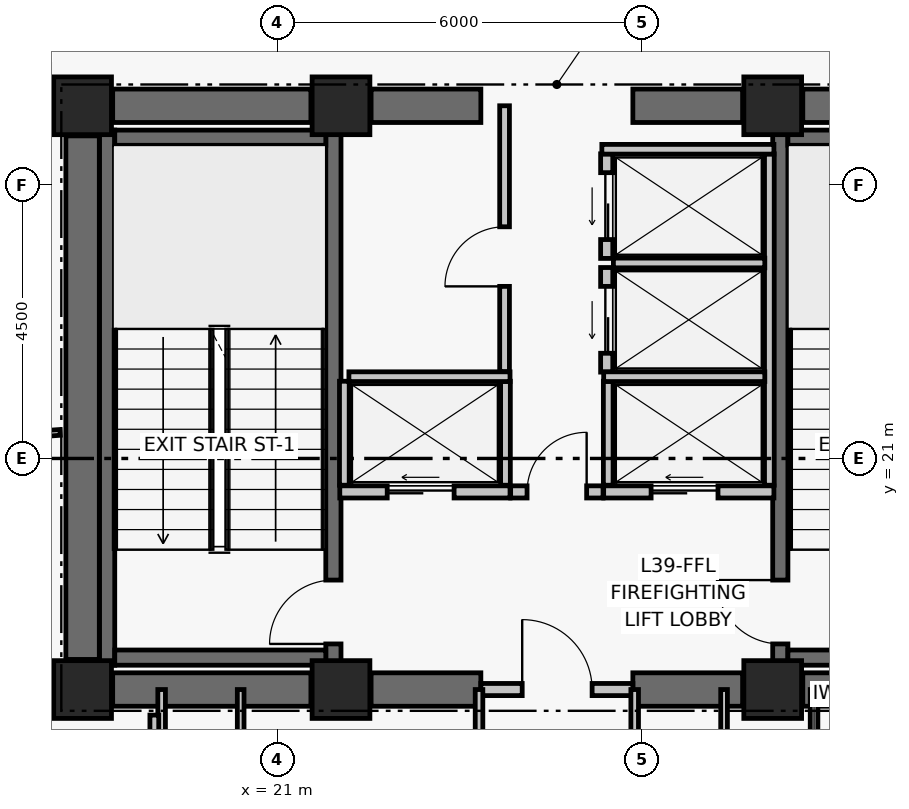
"""IFC4 building model, lengths in metres.
Left out: names, types, materials, properties, quantities, classifications, styles, units other than length and angle.
Written with IfcOpenShell. Run it as: python <this file> out.ifc"""

import sys

from ifc_helpers import new_model, si_unit, direction, frame, frame_2d, origin, origin_2d, place, context, subcontext, project, spatial, rectangle, extrude, element, fill, save


model = new_model("IFC4")
c1 = context("Model", 3, precision=1e-05, world=origin(), true_north=direction((0.0, 1.0)))
c2 = subcontext(c1, "Body", "Model", "MODEL_VIEW")
j1 = project(units=[si_unit("LENGTHUNIT", "METRE"), si_unit("PLANEANGLEUNIT", "RADIAN")], contexts=[c1])
p1 = place(None, origin())
s1 = spatial("IfcSite", under=j1, at=p1, CompositionType="ELEMENT")
p2 = place(p1, origin())
s2 = spatial("IfcBuilding", under=s1, at=p2, CompositionType="ELEMENT")
p3 = place(p2, frame((0.0, 0.0, 158.04)))
s3 = spatial("IfcBuildingStorey", under=s2, at=p3, CompositionType="ELEMENT", Elevation=158.04)
for number, where, z_axis, x_axis in (
    (1, (17.8, 17.2, 0.0), (0.0, 0.0, 1.0), (1.0, 0.0, 0.0)),
    (2, (22.05, 17.2, 0.0), (0.0, 0.0, 1.0), (1.0, 0.0, 0.0)),
    (3, (29.15, 17.2, 0.0), (0.0, 0.0, 1.0), (1.0, 0.0, 0.0)),
    (4, (17.8, 26.8, 0.0), (0.0, 0.0, 1.0), (1.0, 0.0, 0.0)),
    (5, (22.05, 26.8, 0.0), (0.0, 0.0, 1.0), (1.0, 0.0, 0.0)),
    (6, (29.15, 26.8, 0.0), (0.0, 0.0, 1.0), (1.0, 0.0, 0.0)),
):
    element("IfcColumn", number, at=place(p3, frame(where, z_axis=z_axis, x_axis=x_axis)), inside=s3, PredefinedType="COLUMN", context=c2, shape_type="SweptSolid", body=[
        extrude(rectangle(XDim=0.95, YDim=0.95, at=origin_2d()), origin(), (0.0, 0.0, 1.0), 3.72),
    ])
p4 = place(p3, frame((18.295, 17.2, 0.0), z_axis=(0.0, 0.0, 1.0), x_axis=(1.0, 0.0, 0.0)))
e7 = element("IfcWall", 7, at=p4, inside=s3, PredefinedType="SHEAR", context=c2, shape_type="SweptSolid", body=[
    extrude(rectangle(XDim=3.26, YDim=0.55, at=frame_2d((1.63, 0.0))), origin(), (0.0, 0.0, 1.0), 3.5),
])
p5 = place(p3, frame((22.545, 17.2, 0.0), z_axis=(0.0, 0.0, 1.0), x_axis=(1.0, 0.0, 0.0)))
e8 = element("IfcWall", 8, at=p5, inside=s3, PredefinedType="SHEAR", context=c2, shape_type="SweptSolid", body=[
    extrude(rectangle(XDim=1.805, YDim=0.55, at=frame_2d((0.903, 0.0))), origin(), (0.0, 0.0, 1.0), 3.5),
])
p6 = place(p3, frame((26.85, 17.2, 0.0), z_axis=(0.0, 0.0, 1.0), x_axis=(1.0, 0.0, 0.0)))
e9 = element("IfcWall", 9, at=p6, inside=s3, PredefinedType="SHEAR", context=c2, shape_type="SweptSolid", body=[
    extrude(rectangle(XDim=1.805, YDim=0.55, at=frame_2d((0.902, 0.0))), origin(), (0.0, 0.0, 1.0), 3.5),
])
for number, where, z_axis, x_axis in (
    (10, (29.645, 17.2, 0.0), (0.0, 0.0, 1.0), (1.0, 0.0, 0.0)),
    (11, (18.295, 26.8, 0.0), (0.0, 0.0, 1.0), (1.0, 0.0, 0.0)),
):
    element("IfcWall", number, at=place(p3, frame(where, z_axis=z_axis, x_axis=x_axis)), inside=s3, PredefinedType="SHEAR", context=c2, shape_type="SweptSolid", body=[
        extrude(rectangle(XDim=3.26, YDim=0.55, at=frame_2d((1.63, 0.0))), origin(), (0.0, 0.0, 1.0), 3.5),
    ])
p7 = place(p3, frame((22.545, 26.8, 0.0), z_axis=(0.0, 0.0, 1.0), x_axis=(1.0, 0.0, 0.0)))
e12 = element("IfcWall", 12, at=p7, inside=s3, PredefinedType="SHEAR", context=c2, shape_type="SweptSolid", body=[
    extrude(rectangle(XDim=1.805, YDim=0.55, at=frame_2d((0.903, 0.0))), origin(), (0.0, 0.0, 1.0), 3.5),
])
p8 = place(p3, frame((26.85, 26.8, 0.0), z_axis=(0.0, 0.0, 1.0), x_axis=(1.0, 0.0, 0.0)))
e13 = element("IfcWall", 13, at=p8, inside=s3, PredefinedType="SHEAR", context=c2, shape_type="SweptSolid", body=[
    extrude(rectangle(XDim=1.805, YDim=0.55, at=frame_2d((0.902, 0.0))), origin(), (0.0, 0.0, 1.0), 3.5),
])
p9 = place(p3, frame((29.645, 26.8, 0.0), z_axis=(0.0, 0.0, 1.0), x_axis=(1.0, 0.0, 0.0)))
e14 = element("IfcWall", 14, at=p9, inside=s3, PredefinedType="SHEAR", context=c2, shape_type="SweptSolid", body=[
    extrude(rectangle(XDim=3.26, YDim=0.55, at=frame_2d((1.63, 0.0))), origin(), (0.0, 0.0, 1.0), 3.5),
])
p10 = place(p3, frame((17.8, 17.695, 0.0), z_axis=(0.0, 0.0, 1.0), x_axis=(0.0, 1.0, 0.0)))
e15 = element("IfcWall", 15, at=p10, inside=s3, PredefinedType="SHEAR", context=c2, shape_type="SweptSolid", body=[
    extrude(rectangle(XDim=8.61, YDim=0.55, at=frame_2d((4.305, 0.0))), origin(), (0.0, 0.0, 1.0), 3.5),
])
p11 = place(p3, frame((18.204, 17.6, 0.0), z_axis=(0.0, 0.0, 1.0), x_axis=(0.0, 1.0, 0.0)))
e16 = element("IfcWall", 16, at=p11, inside=s3, PredefinedType="SHEAR", context=c2, shape_type="SweptSolid", body=[
    extrude(rectangle(XDim=8.8, YDim=0.25, at=frame_2d((4.4, 0.0))), origin(), (0.0, 0.0, 1.0), 3.5),
])
p12 = place(p3, frame((21.925, 17.6, 0.0), z_axis=(0.0, 0.0, 1.0), x_axis=(0.0, 1.0, 0.0)))
e17 = element("IfcWall", 17, at=p12, inside=s3, PredefinedType="SHEAR", context=c2, shape_type="SweptSolid", body=[
    extrude(rectangle(XDim=8.8, YDim=0.25, at=frame_2d((4.4, 0.0))), origin(), (0.0, 0.0, 1.0), 3.5),
])
p13 = place(p12, frame((0.35, 0.0, 0.0)))
e18 = element("IfcOpeningElement", 18, at=p13, cuts=e17, PredefinedType="OPENING", context=c2, shape_type="SweptSolid", body=[
    extrude(rectangle(XDim=1.05, YDim=2.08, at=frame_2d((0.525, 1.04))), frame((0.0, 0.135, 0.0), z_axis=(0.0, -1.0, 0.0), x_axis=(1.0, 0.0, 0.0)), (0.0, 0.0, 1.0), 0.27),
])
for number, where, z_axis, x_axis in (
    (19, (18.329, 17.725, 0.0), (0.0, 0.0, 1.0), (1.0, 0.0, 0.0)),
    (20, (18.329, 26.275, 0.0), (0.0, 0.0, 1.0), (1.0, 0.0, 0.0)),
):
    element("IfcWall", number, at=place(p3, frame(where, z_axis=z_axis, x_axis=x_axis)), inside=s3, PredefinedType="SHEAR", context=c2, shape_type="SweptSolid", body=[
        extrude(rectangle(XDim=3.471, YDim=0.25, at=frame_2d((1.735, 0.0))), origin(), (0.0, 0.0, 1.0), 3.5),
    ])
p14 = place(p3, frame((29.275, 17.6, 0.0), z_axis=(0.0, 0.0, 1.0), x_axis=(0.0, 1.0, 0.0)))
e21 = element("IfcWall", 21, at=p14, inside=s3, PredefinedType="SHEAR", context=c2, shape_type="SweptSolid", body=[
    extrude(rectangle(XDim=8.8, YDim=0.25, at=frame_2d((4.4, 0.0))), origin(), (0.0, 0.0, 1.0), 3.5),
])
p15 = place(p14, frame((0.35, 0.0, 0.0)))
e22 = element("IfcOpeningElement", 22, at=p15, cuts=e21, PredefinedType="OPENING", context=c2, shape_type="SweptSolid", body=[
    extrude(rectangle(XDim=1.05, YDim=2.08, at=frame_2d((0.525, 1.04))), frame((0.0, 0.135, 0.0), z_axis=(0.0, -1.0, 0.0), x_axis=(1.0, 0.0, 0.0)), (0.0, 0.0, 1.0), 0.27),
])
for number, where, z_axis, x_axis in (
    (23, (29.4, 17.725, 0.0), (0.0, 0.0, 1.0), (1.0, 0.0, 0.0)),
    (24, (29.4, 26.275, 0.0), (0.0, 0.0, 1.0), (1.0, 0.0, 0.0)),
):
    element("IfcWall", number, at=place(p3, frame(where, z_axis=z_axis, x_axis=x_axis)), inside=s3, PredefinedType="SHEAR", context=c2, shape_type="SweptSolid", body=[
        extrude(rectangle(XDim=3.471, YDim=0.25, at=frame_2d((1.736, 0.0))), origin(), (0.0, 0.0, 1.0), 3.5),
    ])
p16 = place(p3, frame((24.35, 17.2, 0.0), z_axis=(0.0, 0.0, 1.0), x_axis=(1.0, 0.0, 0.0)))
e25 = element("IfcWall", 25, at=p16, inside=s3, PredefinedType="PARTITIONING", context=c2, shape_type="SweptSolid", body=[
    extrude(rectangle(XDim=2.5, YDim=0.2, at=frame_2d((1.25, 0.0))), origin(), (0.0, 0.0, 1.0), 2.63),
])
p17 = place(p16, frame((0.68, 0.0, 0.0)))
e26 = element("IfcOpeningElement", 26, at=p17, cuts=e25, PredefinedType="OPENING", context=c2, shape_type="SweptSolid", body=[
    extrude(rectangle(XDim=1.15, YDim=2.08, at=frame_2d((0.575, 1.04))), frame((0.0, 0.11, 0.0), z_axis=(0.0, -1.0, 0.0), x_axis=(1.0, 0.0, 0.0)), (0.0, 0.0, 1.0), 0.22),
])
p18 = place(p3, frame((24.84, 20.45, 0.0), z_axis=(0.0, 0.0, 1.0), x_axis=(1.0, 0.0, 0.0)))
e27 = element("IfcWall", 27, at=p18, inside=s3, PredefinedType="PARTITIONING", context=c2, shape_type="SweptSolid", body=[
    extrude(rectangle(XDim=1.52, YDim=0.2, at=frame_2d((0.76, 0.0))), origin(), (0.0, 0.0, 1.0), 3.5),
])
p19 = place(p18, frame((0.27, 0.0, 0.0)))
e28 = element("IfcOpeningElement", 28, at=p19, cuts=e27, PredefinedType="OPENING", context=c2, shape_type="SweptSolid", body=[
    extrude(rectangle(XDim=0.98, YDim=2.06, at=frame_2d((0.49, 1.03))), frame((0.0, 0.11, 0.0), z_axis=(0.0, -1.0, 0.0), x_axis=(1.0, 0.0, 0.0)), (0.0, 0.0, 1.0), 0.22),
])
p20 = place(p3, frame((22.03, 20.45, 0.0), z_axis=(0.0, 0.0, 1.0), x_axis=(1.0, 0.0, 0.0)))
e29 = element("IfcWall", 29, at=p20, inside=s3, PredefinedType="PARTITIONING", context=c2, shape_type="SweptSolid", body=[
    extrude(rectangle(XDim=2.8, YDim=0.2, at=frame_2d((1.4, 0.0))), origin(), (0.0, 0.0, 1.0), 3.5),
])
p21 = place(p20, frame((0.78, 0.0, 0.0)))
e30 = element("IfcOpeningElement", 30, at=p21, cuts=e29, PredefinedType="OPENING", context=c2, shape_type="SweptSolid", body=[
    extrude(rectangle(XDim=1.1, YDim=2.08, at=frame_2d((0.55, 1.04))), frame((0.0, 0.11, 0.0), z_axis=(0.0, -1.0, 0.0), x_axis=(1.0, 0.0, 0.0)), (0.0, 0.0, 1.0), 0.22),
])
p22 = place(p3, frame((26.37, 20.45, 0.0), z_axis=(0.0, 0.0, 1.0), x_axis=(1.0, 0.0, 0.0)))
e31 = element("IfcWall", 31, at=p22, inside=s3, PredefinedType="PARTITIONING", context=c2, shape_type="SweptSolid", body=[
    extrude(rectangle(XDim=2.8, YDim=0.2, at=frame_2d((1.4, 0.0))), origin(), (0.0, 0.0, 1.0), 3.5),
])
p23 = place(p22, frame((0.78, 0.0, 0.0)))
e32 = element("IfcOpeningElement", 32, at=p23, cuts=e31, PredefinedType="OPENING", context=c2, shape_type="SweptSolid", body=[
    extrude(rectangle(XDim=1.1, YDim=2.08, at=frame_2d((0.55, 1.04))), frame((0.0, 0.11, 0.0), z_axis=(0.0, -1.0, 0.0), x_axis=(1.0, 0.0, 0.0)), (0.0, 0.0, 1.0), 0.22),
])
p24 = place(p3, frame((26.42, 22.42, 0.0), z_axis=(0.0, 0.0, 1.0), x_axis=(0.0, 1.0, 0.0)))
e33 = element("IfcWall", 33, at=p24, inside=s3, PredefinedType="PARTITIONING", context=c2, shape_type="SweptSolid", body=[
    extrude(rectangle(XDim=1.72, YDim=0.2, at=frame_2d((0.86, 0.0))), origin(), (0.0, 0.0, 1.0), 3.5),
])
p25 = place(p24, frame((0.31, 0.0, 0.0)))
e34 = element("IfcOpeningElement", 34, at=p25, cuts=e33, PredefinedType="OPENING", context=c2, shape_type="SweptSolid", body=[
    extrude(rectangle(XDim=1.1, YDim=2.08, at=frame_2d((0.55, 1.04))), frame((0.0, 0.11, 0.0), z_axis=(0.0, -1.0, 0.0), x_axis=(1.0, 0.0, 0.0)), (0.0, 0.0, 1.0), 0.22),
])
p26 = place(p3, frame((26.42, 24.29, 0.0), z_axis=(0.0, 0.0, 1.0), x_axis=(0.0, 1.0, 0.0)))
e35 = element("IfcWall", 35, at=p26, inside=s3, PredefinedType="PARTITIONING", context=c2, shape_type="SweptSolid", body=[
    extrude(rectangle(XDim=1.72, YDim=0.2, at=frame_2d((0.86, 0.0))), origin(), (0.0, 0.0, 1.0), 3.5),
])
p27 = place(p26, frame((0.31, 0.0, 0.0)))
e36 = element("IfcOpeningElement", 36, at=p27, cuts=e35, PredefinedType="OPENING", context=c2, shape_type="SweptSolid", body=[
    extrude(rectangle(XDim=1.1, YDim=2.08, at=frame_2d((0.55, 1.04))), frame((0.0, 0.11, 0.0), z_axis=(0.0, -1.0, 0.0), x_axis=(1.0, 0.0, 0.0)), (0.0, 0.0, 1.0), 0.22),
])
for number, where, z_axis, x_axis in (
    (37, (22.105, 20.56, 0.0), (0.0, 0.0, 1.0), (0.0, 1.0, 0.0)),
    (38, (24.755, 20.56, 0.0), (0.0, 0.0, 1.0), (0.0, 1.0, 0.0)),
):
    element("IfcWall", number, at=place(p3, frame(where, z_axis=z_axis, x_axis=x_axis)), inside=s3, PredefinedType="PARTITIONING", context=c2, shape_type="SweptSolid", body=[
        extrude(rectangle(XDim=1.71, YDim=0.16, at=frame_2d((0.855, 0.0))), origin(), (0.0, 0.0, 1.0), 3.5),
    ])
p28 = place(p3, frame((22.18, 22.345, 0.0), z_axis=(0.0, 0.0, 1.0), x_axis=(1.0, 0.0, 0.0)))
e39 = element("IfcWall", 39, at=p28, inside=s3, PredefinedType="PARTITIONING", context=c2, shape_type="SweptSolid", body=[
    extrude(rectangle(XDim=2.65, YDim=0.16, at=frame_2d((1.325, 0.0))), origin(), (0.0, 0.0, 1.0), 3.5),
])
p29 = place(p3, frame((29.095, 20.56, 0.0), z_axis=(0.0, 0.0, 1.0), x_axis=(0.0, 1.0, 0.0)))
e40 = element("IfcWall", 40, at=p29, inside=s3, PredefinedType="PARTITIONING", context=c2, shape_type="SweptSolid", body=[
    extrude(rectangle(XDim=5.45, YDim=0.16, at=frame_2d((2.725, 0.0))), origin(), (0.0, 0.0, 1.0), 3.5),
])
p30 = place(p3, frame((26.445, 20.56, 0.0), z_axis=(0.0, 0.0, 1.0), x_axis=(0.0, 1.0, 0.0)))
e41 = element("IfcWall", 41, at=p30, inside=s3, PredefinedType="PARTITIONING", context=c2, shape_type="SweptSolid", body=[
    extrude(rectangle(XDim=1.71, YDim=0.16, at=frame_2d((0.855, 0.0))), origin(), (0.0, 0.0, 1.0), 3.5),
])
p31 = place(p3, frame((26.37, 22.345, 0.0), z_axis=(0.0, 0.0, 1.0), x_axis=(1.0, 0.0, 0.0)))
e42 = element("IfcWall", 42, at=p31, inside=s3, PredefinedType="PARTITIONING", context=c2, shape_type="SweptSolid", body=[
    extrude(rectangle(XDim=2.65, YDim=0.16, at=frame_2d((1.325, 0.0))), origin(), (0.0, 0.0, 1.0), 3.5),
])
p32 = place(p3, frame((26.53, 24.215, 0.0), z_axis=(0.0, 0.0, 1.0), x_axis=(1.0, 0.0, 0.0)))
e43 = element("IfcWall", 43, at=p32, inside=s3, PredefinedType="PARTITIONING", context=c2, shape_type="SweptSolid", body=[
    extrude(rectangle(XDim=2.49, YDim=0.16, at=frame_2d((1.245, 0.0))), origin(), (0.0, 0.0, 1.0), 3.5),
])
p33 = place(p3, frame((26.34, 26.085, 0.0), z_axis=(0.0, 0.0, 1.0), x_axis=(1.0, 0.0, 0.0)))
e44 = element("IfcWall", 44, at=p33, inside=s3, PredefinedType="PARTITIONING", context=c2, shape_type="SweptSolid", body=[
    extrude(rectangle(XDim=2.83, YDim=0.16, at=frame_2d((1.415, 0.0))), origin(), (0.0, 0.0, 1.0), 3.5),
])
p34 = place(p3, frame((24.74, 22.43, 0.0), z_axis=(0.0, 0.0, 1.0), x_axis=(0.0, 1.0, 0.0)))
e45 = element("IfcWall", 45, at=p34, inside=s3, PredefinedType="PARTITIONING", context=c2, shape_type="SweptSolid", body=[
    extrude(rectangle(XDim=4.37, YDim=0.16, at=frame_2d((2.185, 0.0))), origin(), (0.0, 0.0, 1.0), 2.63),
])
p35 = place(p34, frame((1.4, 0.0, 0.0)))
e46 = element("IfcOpeningElement", 46, at=p35, cuts=e45, PredefinedType="OPENING", context=c2, shape_type="SweptSolid", body=[
    extrude(rectangle(XDim=0.98, YDim=2.06, at=frame_2d((0.49, 1.03))), frame((0.0, 0.09, 0.0), z_axis=(0.0, -1.0, 0.0), x_axis=(1.0, 0.0, 0.0)), (0.0, 0.0, 1.0), 0.18),
])
p36 = place(p3, frame((19.1, 14.95, 0.0), z_axis=(0.0, 0.0, 1.0), x_axis=(0.0, 1.0, 0.0)))
e47 = element("IfcWall", 47, at=p36, inside=s3, PredefinedType="PARTITIONING", context=c2, shape_type="SweptSolid", body=[
    extrude(rectangle(XDim=2.25, YDim=0.125, at=frame_2d((1.125, 0.0))), origin(), (0.0, 0.0, 1.0), 2.63),
])
p37 = place(p3, frame((20.4, 14.95, 0.0), z_axis=(0.0, 0.0, 1.0), x_axis=(0.0, 1.0, 0.0)))
e48 = element("IfcWall", 48, at=p37, inside=s3, PredefinedType="PARTITIONING", context=c2, shape_type="SweptSolid", body=[
    extrude(rectangle(XDim=2.25, YDim=0.11, at=frame_2d((1.125, 0.0))), origin(), (0.0, 0.0, 1.0), 2.63),
])
for number, where, z_axis, x_axis in (
    (49, (24.32, 14.95, 0.0), (0.0, 0.0, 1.0), (0.0, 1.0, 0.0)),
    (50, (26.88, 14.95, 0.0), (0.0, 0.0, 1.0), (0.0, 1.0, 0.0)),
):
    element("IfcWall", number, at=place(p3, frame(where, z_axis=z_axis, x_axis=x_axis)), inside=s3, PredefinedType="PARTITIONING", context=c2, shape_type="SweptSolid", body=[
        extrude(rectangle(XDim=2.25, YDim=0.125, at=frame_2d((1.125, 0.0))), origin(), (0.0, 0.0, 1.0), 2.63),
    ])
p38 = place(p3, frame((28.35, 14.95, 0.0), z_axis=(0.0, 0.0, 1.0), x_axis=(0.0, 1.0, 0.0)))
e51 = element("IfcWall", 51, at=p38, inside=s3, PredefinedType="PARTITIONING", context=c2, shape_type="SweptSolid", body=[
    extrude(rectangle(XDim=2.25, YDim=0.11, at=frame_2d((1.125, 0.0))), origin(), (0.0, 0.0, 1.0), 2.63),
])
p39 = place(p3, frame((29.83, 14.95, 0.0), z_axis=(0.0, 0.0, 1.0), x_axis=(0.0, 1.0, 0.0)))
e52 = element("IfcWall", 52, at=p39, inside=s3, PredefinedType="PARTITIONING", context=c2, shape_type="SweptSolid", body=[
    extrude(rectangle(XDim=2.25, YDim=0.125, at=frame_2d((1.125, 0.0))), origin(), (0.0, 0.0, 1.0), 2.63),
])
p40 = place(p3, frame((18.98, 16.78, 0.0), z_axis=(0.0, 0.0, 1.0), x_axis=(0.0, -1.0, 0.0)))
e53 = element("IfcWall", 53, at=p40, inside=s3, PredefinedType="PARTITIONING", context=c2, shape_type="SweptSolid", body=[
    extrude(rectangle(XDim=1.85, YDim=0.145, at=frame_2d((0.925, 0.0))), origin(), (0.0, 0.0, 1.0), 2.63),
])
p41 = place(p3, frame((15.2, 27.06, 0.0), z_axis=(0.0, 0.0, 1.0), x_axis=(1.0, 0.0, 0.0)))
e54 = element("IfcWall", 54, at=p41, inside=s3, PredefinedType="PARTITIONING", context=c2, shape_type="SweptSolid", body=[
    extrude(rectangle(XDim=2.18, YDim=0.145, at=frame_2d((1.09, 0.0))), origin(), (0.0, 0.0, 1.0), 2.73),
])
p42 = place(p41, frame((0.28, 0.0, 0.0)))
e55 = element("IfcOpeningElement", 55, at=p42, cuts=e54, PredefinedType="OPENING", context=c2, shape_type="SweptSolid", body=[
    extrude(rectangle(XDim=0.92, YDim=2.05, at=frame_2d((0.46, 1.025))), frame((0.0, 0.083, 0.0), z_axis=(0.0, -1.0, 0.0), x_axis=(1.0, 0.0, 0.0)), (0.0, 0.0, 1.0), 0.165),
])
p43 = place(p3, frame((17.43, 21.429, 0.0), z_axis=(0.0, 0.0, 1.0), x_axis=(-0.997563032527, -0.069771026481, 0.0)))
e56 = element("IfcWall", 56, at=p43, inside=s3, PredefinedType="PARTITIONING", context=c2, shape_type="SweptSolid", body=[
    extrude(rectangle(XDim=5.854, YDim=0.095, at=frame_2d((2.927, 0.0))), origin(), (0.0, 0.0, 1.0), 2.63),
])
p44 = place(p13, origin())
e57 = element("IfcDoor", 57, at=p44, inside=s3, OperationType="SINGLE_SWING_LEFT", PredefinedType="DOOR", context=c2, shape_type="SweptSolid", body=[
    extrude(rectangle(XDim=1.05, YDim=2.08, at=frame_2d((0.525, 1.04))), frame((0.0, 0.025, 0.0), z_axis=(0.0, -1.0, 0.0), x_axis=(1.0, 0.0, 0.0)), (0.0, 0.0, 1.0), 0.05),
])
fill(e18, e57)
p45 = place(p15, origin())
e58 = element("IfcDoor", 58, at=p45, inside=s3, OperationType="SINGLE_SWING_RIGHT", PredefinedType="DOOR", context=c2, shape_type="SweptSolid", body=[
    extrude(rectangle(XDim=1.05, YDim=2.08, at=frame_2d((0.525, 1.04))), frame((0.0, 0.025, 0.0), z_axis=(0.0, -1.0, 0.0), x_axis=(1.0, 0.0, 0.0)), (0.0, 0.0, 1.0), 0.05),
])
fill(e22, e58)
p46 = place(p17, origin())
e59 = element("IfcDoor", 59, at=p46, inside=s3, OperationType="SINGLE_SWING_LEFT", PredefinedType="DOOR", context=c2, shape_type="SweptSolid", body=[
    extrude(rectangle(XDim=1.15, YDim=2.08, at=frame_2d((0.575, 1.04))), frame((0.0, 0.025, 0.0), z_axis=(0.0, -1.0, 0.0), x_axis=(1.0, 0.0, 0.0)), (0.0, 0.0, 1.0), 0.05),
])
fill(e26, e59)
p47 = place(p19, origin())
e60 = element("IfcDoor", 60, at=p47, inside=s3, OperationType="SINGLE_SWING_RIGHT", PredefinedType="DOOR", context=c2, shape_type="SweptSolid", body=[
    extrude(rectangle(XDim=0.98, YDim=2.06, at=frame_2d((0.49, 1.03))), frame((0.0, 0.025, 0.0), z_axis=(0.0, -1.0, 0.0), x_axis=(1.0, 0.0, 0.0)), (0.0, 0.0, 1.0), 0.05),
])
fill(e28, e60)
p48 = place(p21, origin())
e61 = element("IfcDoor", 61, at=p48, inside=s3, OperationType="DOUBLE_DOOR_SLIDING", PredefinedType="DOOR", context=c2, shape_type="SweptSolid", body=[
    extrude(rectangle(XDim=1.1, YDim=2.08, at=frame_2d((0.55, 1.04))), frame((0.0, 0.025, 0.0), z_axis=(0.0, -1.0, 0.0), x_axis=(1.0, 0.0, 0.0)), (0.0, 0.0, 1.0), 0.05),
])
fill(e30, e61)
p49 = place(p23, origin())
e62 = element("IfcDoor", 62, at=p49, inside=s3, OperationType="DOUBLE_DOOR_SLIDING", PredefinedType="DOOR", context=c2, shape_type="SweptSolid", body=[
    extrude(rectangle(XDim=1.1, YDim=2.08, at=frame_2d((0.55, 1.04))), frame((0.0, 0.025, 0.0), z_axis=(0.0, -1.0, 0.0), x_axis=(1.0, 0.0, 0.0)), (0.0, 0.0, 1.0), 0.05),
])
fill(e32, e62)
p50 = place(p25, origin())
e63 = element("IfcDoor", 63, at=p50, inside=s3, OperationType="DOUBLE_DOOR_SLIDING", PredefinedType="DOOR", context=c2, shape_type="SweptSolid", body=[
    extrude(rectangle(XDim=1.1, YDim=2.08, at=frame_2d((0.55, 1.04))), frame((0.0, 0.025, 0.0), z_axis=(0.0, -1.0, 0.0), x_axis=(1.0, 0.0, 0.0)), (0.0, 0.0, 1.0), 0.05),
])
fill(e34, e63)
p51 = place(p27, origin())
e64 = element("IfcDoor", 64, at=p51, inside=s3, OperationType="DOUBLE_DOOR_SLIDING", PredefinedType="DOOR", context=c2, shape_type="SweptSolid", body=[
    extrude(rectangle(XDim=1.1, YDim=2.08, at=frame_2d((0.55, 1.04))), frame((0.0, 0.025, 0.0), z_axis=(0.0, -1.0, 0.0), x_axis=(1.0, 0.0, 0.0)), (0.0, 0.0, 1.0), 0.05),
])
fill(e36, e64)
p52 = place(p35, origin())
e65 = element("IfcDoor", 65, at=p52, inside=s3, OperationType="SINGLE_SWING_LEFT", PredefinedType="DOOR", context=c2, shape_type="SweptSolid", body=[
    extrude(rectangle(XDim=0.98, YDim=2.06, at=frame_2d((0.49, 1.03))), frame((0.0, 0.025, 0.0), z_axis=(0.0, -1.0, 0.0), x_axis=(1.0, 0.0, 0.0)), (0.0, 0.0, 1.0), 0.05),
])
fill(e46, e65)
save(model, sys.argv[1])
